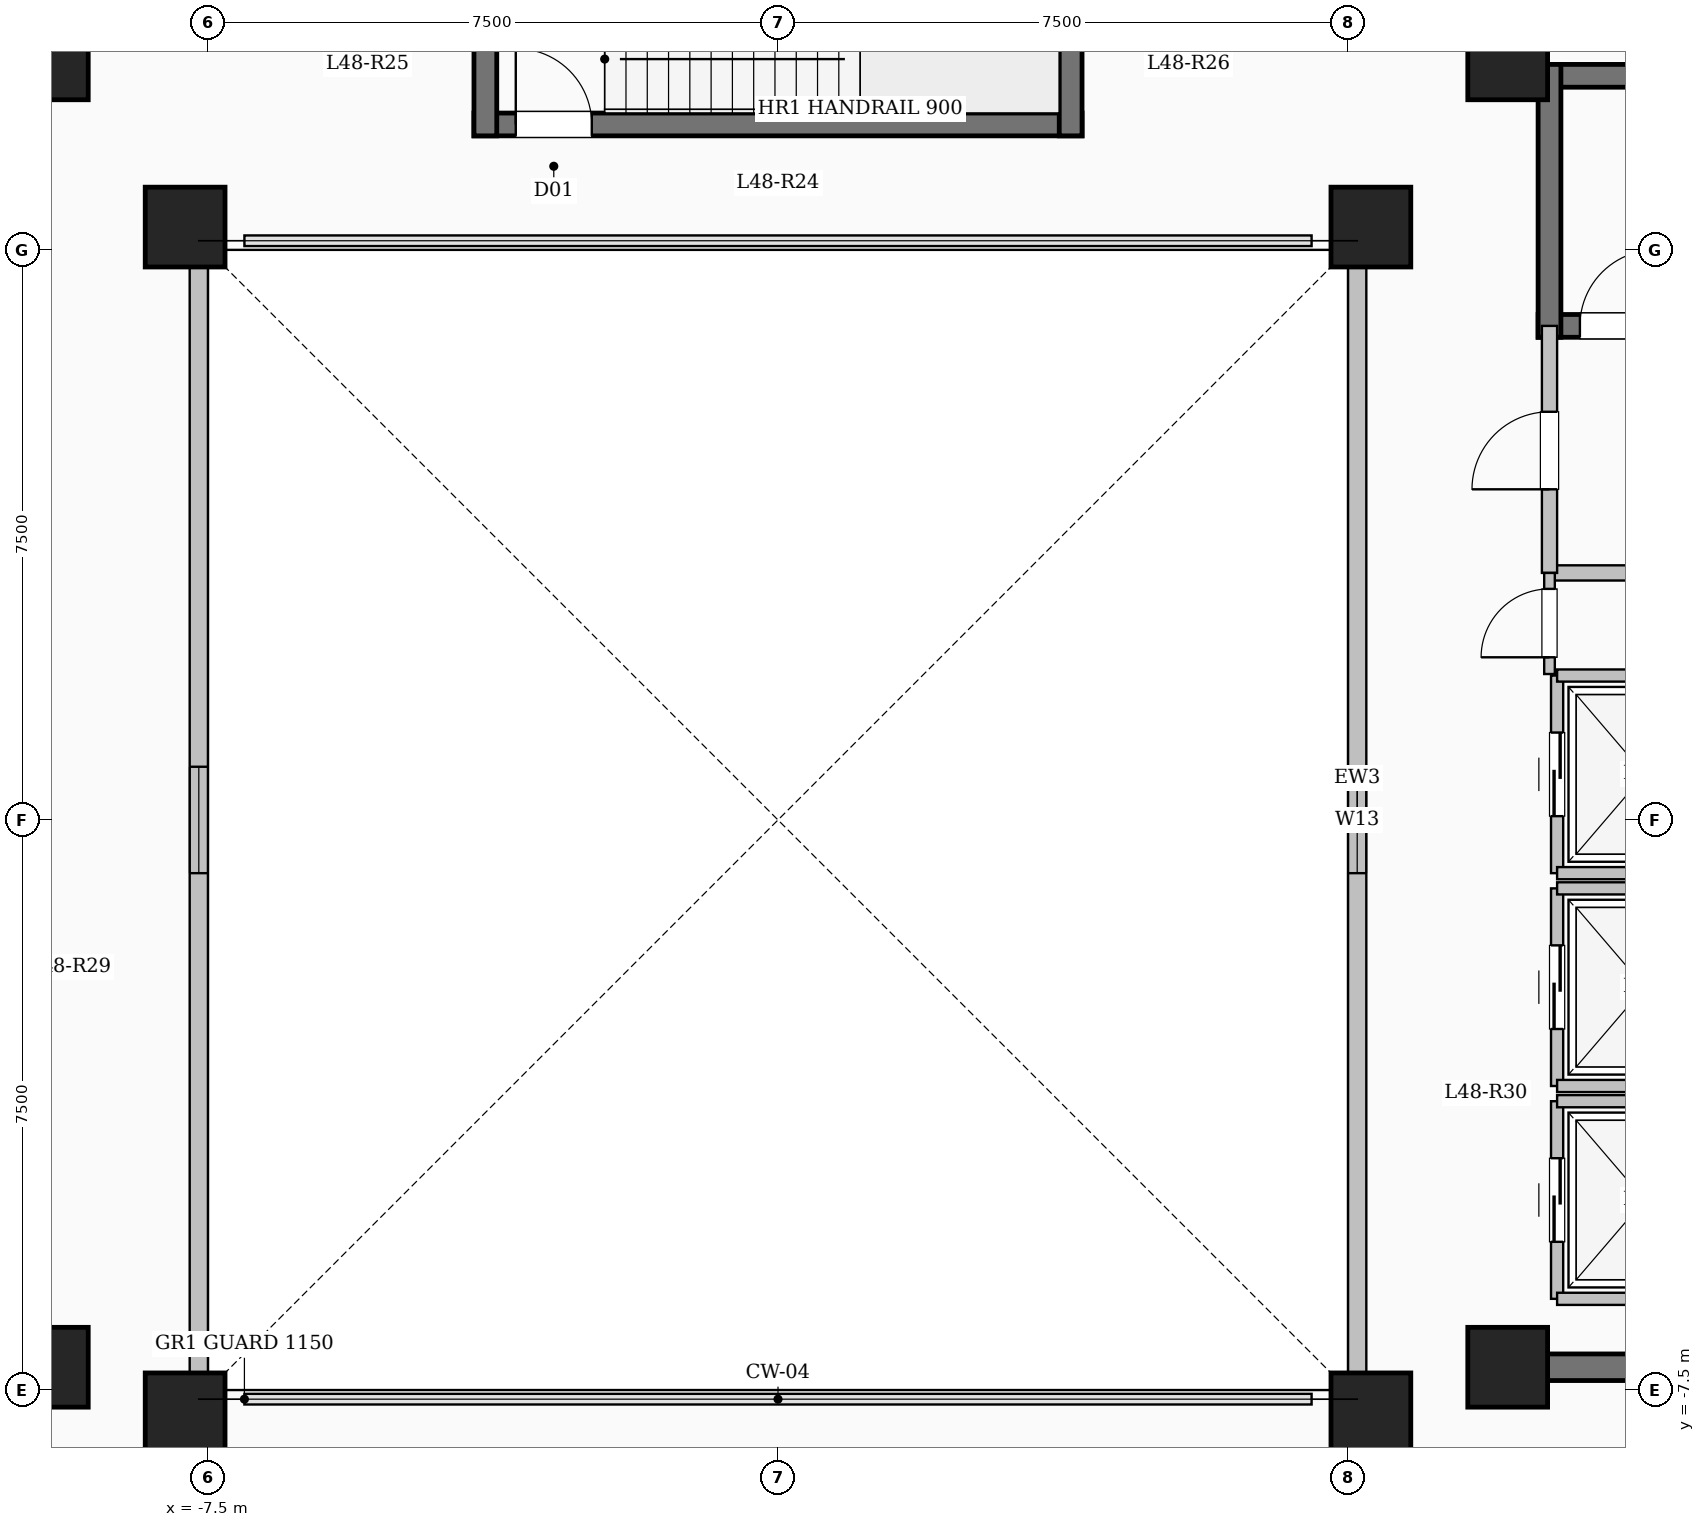
"""IFC4 building model, lengths in metres.
Left out: names, types, materials, properties, quantities, classifications, styles, units other than length and angle.
Written with IfcOpenShell. Run it as: python <this file> out.ifc"""

import sys

from ifc_helpers import new_model, si_unit, direction, frame, frame_2d, origin, origin_2d, place, context, subcontext, project, spatial, rectangle, extrude, element, fill, save


model = new_model("IFC4")
c1 = context("Model", 3, precision=1e-05, world=origin(), true_north=direction((0.0, 1.0)))
c2 = subcontext(c1, "Body", "Model", "MODEL_VIEW")
j1 = project(units=[si_unit("LENGTHUNIT", "METRE"), si_unit("PLANEANGLEUNIT", "RADIAN")], contexts=[c1])
p1 = place(None, origin())
s1 = spatial("IfcSite", under=j1, at=p1, CompositionType="ELEMENT")
p2 = place(p1, origin())
s2 = spatial("IfcBuilding", under=s1, at=p2, CompositionType="ELEMENT")
p3 = place(p2, frame((0.0, 0.0, 177.3)))
s3 = spatial("IfcBuildingStorey", under=s2, at=p3, CompositionType="ELEMENT", Elevation=177.3)
for number, where, z_axis, x_axis in (
    (1, (-7.8, -7.8, 0.0), (0.0, 0.0, 1.0), (1.0, 0.0, 0.0)),
    (2, (7.8, -7.8, 0.0), (0.0, 0.0, 1.0), (1.0, 0.0, 0.0)),
    (3, (-7.8, 7.8, 0.0), (0.0, 0.0, 1.0), (1.0, 0.0, 0.0)),
    (4, (7.8, 7.8, 0.0), (0.0, 0.0, 1.0), (1.0, 0.0, 0.0)),
    (5, (-9.6, -7.2, 0.0), (0.0, 0.0, 1.0), (1.0, 0.0, 0.0)),
    (6, (-9.6, 10.0, 0.0), (0.0, 0.0, 1.0), (1.0, 0.0, 0.0)),
    (7, (9.6, -7.2, 0.0), (0.0, 0.0, 1.0), (1.0, 0.0, 0.0)),
    (8, (9.6, 10.0, 0.0), (0.0, 0.0, 1.0), (1.0, 0.0, 0.0)),
):
    element("IfcColumn", number, at=place(p3, frame(where, z_axis=z_axis, x_axis=x_axis)), inside=s3, PredefinedType="COLUMN", context=c2, shape_type="SweptSolid", body=[
        extrude(rectangle(XDim=1.05, YDim=1.05, at=origin_2d()), origin(), (0.0, 0.0, 1.0), 4.5),
    ])
p4 = place(p3, frame((7.62, -7.62, 0.0), z_axis=(0.0, 0.0, 1.0), x_axis=(0.0, 1.0, 0.0)))
e9 = element("IfcWall", 9, at=p4, inside=s3, PredefinedType="SOLIDWALL", context=c2, shape_type="SweptSolid", body=[
    extrude(rectangle(XDim=15.24, YDim=0.24, at=frame_2d((7.62, 0.0))), origin(), (0.0, 0.0, 1.0), 4.2),
])
p5 = place(p4, frame((6.92, 0.0, 0.95)))
e10 = element("IfcOpeningElement", 10, at=p5, cuts=e9, PredefinedType="OPENING", context=c2, shape_type="SweptSolid", body=[
    extrude(rectangle(XDim=1.4, YDim=1.5, at=frame_2d((0.7, 0.75))), frame((0.0, 0.13, 0.0), z_axis=(0.0, -1.0, 0.0), x_axis=(1.0, 0.0, 0.0)), (0.0, 0.0, 1.0), 0.26),
])
p6 = place(p3, frame((-7.62, 7.62, 0.0), z_axis=(0.0, 0.0, 1.0), x_axis=(0.0, -1.0, 0.0)))
e11 = element("IfcWall", 11, at=p6, inside=s3, PredefinedType="SOLIDWALL", context=c2, shape_type="SweptSolid", body=[
    extrude(rectangle(XDim=15.24, YDim=0.24, at=frame_2d((7.62, 0.0))), origin(), (0.0, 0.0, 1.0), 4.2),
])
p7 = place(p6, frame((6.92, 0.0, 0.95)))
e12 = element("IfcOpeningElement", 12, at=p7, cuts=e11, PredefinedType="OPENING", context=c2, shape_type="SweptSolid", body=[
    extrude(rectangle(XDim=1.4, YDim=1.5, at=frame_2d((0.7, 0.75))), frame((0.0, 0.13, 0.0), z_axis=(0.0, -1.0, 0.0), x_axis=(1.0, 0.0, 0.0)), (0.0, 0.0, 1.0), 0.26),
])
p8 = place(p3, frame((10.0, 9.79, 0.0), z_axis=(0.0, 0.0, 1.0), x_axis=(1.0, 0.0, 0.0)))
e13 = element("IfcWall", 13, at=p8, inside=s3, PredefinedType="SHEAR", context=c2, shape_type="SweptSolid", body=[
    extrude(rectangle(XDim=8.0, YDim=0.3, at=frame_2d((4.0, 0.0))), origin(), (0.0, 0.0, 1.0), 4.5),
])
p9 = place(p3, frame((10.0, 6.5, 0.0), z_axis=(0.0, 0.0, 1.0), x_axis=(1.0, 0.0, 0.0)))
e14 = element("IfcWall", 14, at=p9, inside=s3, PredefinedType="SHEAR", context=c2, shape_type="SweptSolid", body=[
    extrude(rectangle(XDim=8.0, YDim=0.3, at=frame_2d((4.0, 0.0))), origin(), (0.0, 0.0, 1.0), 4.5),
])
p10 = place(p9, frame((0.55, 0.0, 0.0)))
e15 = element("IfcOpeningElement", 15, at=p10, cuts=e14, PredefinedType="OPENING", context=c2, shape_type="SweptSolid", body=[
    extrude(rectangle(XDim=1.0, YDim=2.15, at=frame_2d((0.5, 1.075))), frame((0.0, 0.16, 0.0), z_axis=(0.0, -1.0, 0.0), x_axis=(1.0, 0.0, 0.0)), (0.0, 0.0, 1.0), 0.32),
])
p11 = place(p3, frame((10.15, 6.35, 0.0), z_axis=(0.0, 0.0, 1.0), x_axis=(0.0, 1.0, 0.0)))
e16 = element("IfcWall", 16, at=p11, inside=s3, PredefinedType="SHEAR", context=c2, shape_type="SweptSolid", body=[
    extrude(rectangle(XDim=3.59, YDim=0.3, at=frame_2d((1.795, 0.0))), origin(), (0.0, 0.0, 1.0), 4.5),
])
p12 = place(p3, frame((-4.0, 9.15, 0.0), z_axis=(0.0, 0.0, 1.0), x_axis=(1.0, 0.0, 0.0)))
e17 = element("IfcWall", 17, at=p12, inside=s3, PredefinedType="SHEAR", context=c2, shape_type="SweptSolid", body=[
    extrude(rectangle(XDim=8.0, YDim=0.3, at=frame_2d((4.0, 0.0))), origin(), (0.0, 0.0, 1.0), 4.5),
])
p13 = place(p12, frame((0.55, 0.0, 0.0)))
e18 = element("IfcOpeningElement", 18, at=p13, cuts=e17, PredefinedType="OPENING", context=c2, shape_type="SweptSolid", body=[
    extrude(rectangle(XDim=1.0, YDim=2.15, at=frame_2d((0.5, 1.075))), frame((0.0, 0.16, 0.0), z_axis=(0.0, -1.0, 0.0), x_axis=(1.0, 0.0, 0.0)), (0.0, 0.0, 1.0), 0.32),
])
for number, where, z_axis, x_axis in (
    (19, (-3.85, 9.0, 0.0), (0.0, 0.0, 1.0), (0.0, 1.0, 0.0)),
    (20, (3.85, 9.0, 0.0), (0.0, 0.0, 1.0), (0.0, 1.0, 0.0)),
):
    element("IfcWall", number, at=place(p3, frame(where, z_axis=z_axis, x_axis=x_axis)), inside=s3, PredefinedType="SHEAR", context=c2, shape_type="SweptSolid", body=[
        extrude(rectangle(XDim=3.59, YDim=0.3, at=frame_2d((1.795, 0.0))), origin(), (0.0, 0.0, 1.0), 4.5),
    ])
p14 = place(p3, frame((10.15, 3.25, 0.0), z_axis=(0.0, 0.0, 1.0), x_axis=(1.0, 0.0, 0.0)))
e21 = element("IfcWall", 21, at=p14, inside=s3, PredefinedType="SOLIDWALL", context=c2, shape_type="SweptSolid", body=[
    extrude(rectangle(XDim=5.4, YDim=0.2, at=frame_2d((2.7, 0.0))), origin(), (0.0, 0.0, 1.0), 4.2),
])
p15 = place(p3, frame((10.15, 3.25, 0.0), z_axis=(0.0, 0.0, 1.0), x_axis=(0.0, 1.0, 0.0)))
e22 = element("IfcWall", 22, at=p15, inside=s3, PredefinedType="SOLIDWALL", context=c2, shape_type="SweptSolid", body=[
    extrude(rectangle(XDim=3.25, YDim=0.2, at=frame_2d((1.625, 0.0))), origin(), (0.0, 0.0, 1.0), 4.2),
])
p16 = place(p15, frame((1.1, 0.0, 0.0)))
e23 = element("IfcOpeningElement", 23, at=p16, cuts=e22, PredefinedType="OPENING", context=c2, shape_type="SweptSolid", body=[
    extrude(rectangle(XDim=1.02, YDim=2.15, at=frame_2d((0.51, 1.075))), frame((0.0, 0.11, 0.0), z_axis=(0.0, -1.0, 0.0), x_axis=(1.0, 0.0, 0.0)), (0.0, 0.0, 1.0), 0.22),
])
p17 = place(p3, frame((10.25, -6.3, 0.0), z_axis=(0.0, 0.0, 1.0), x_axis=(0.0, 1.0, 0.0)))
e24 = element("IfcWall", 24, at=p17, inside=s3, PredefinedType="SOLIDWALL", context=c2, shape_type="SweptSolid", body=[
    extrude(rectangle(XDim=2.6, YDim=0.16, at=frame_2d((1.3, 0.0))), origin(), (0.0, 0.0, 1.0), 4.2),
])
p18 = place(p17, frame((0.75, 0.0, 0.0)))
e25 = element("IfcOpeningElement", 25, at=p18, cuts=e24, PredefinedType="OPENING", context=c2, shape_type="SweptSolid", body=[
    extrude(rectangle(XDim=1.1, YDim=2.15, at=frame_2d((0.55, 1.075))), frame((0.0, 0.09, 0.0), z_axis=(0.0, -1.0, 0.0), x_axis=(1.0, 0.0, 0.0)), (0.0, 0.0, 1.0), 0.18),
])
for number, where, z_axis, x_axis in (
    (26, (10.25, -6.3, 0.0), (0.0, 0.0, 1.0), (1.0, 0.0, 0.0)),
    (27, (10.25, -3.7, 0.0), (0.0, 0.0, 1.0), (1.0, 0.0, 0.0)),
):
    element("IfcWall", number, at=place(p3, frame(where, z_axis=z_axis, x_axis=x_axis)), inside=s3, PredefinedType="SOLIDWALL", context=c2, shape_type="SweptSolid", body=[
        extrude(rectangle(XDim=2.3, YDim=0.16, at=frame_2d((1.15, 0.0))), origin(), (0.0, 0.0, 1.0), 4.2),
    ])
p19 = place(p3, frame((10.25, -3.5, 0.0), z_axis=(0.0, 0.0, 1.0), x_axis=(0.0, 1.0, 0.0)))
e28 = element("IfcWall", 28, at=p19, inside=s3, PredefinedType="SOLIDWALL", context=c2, shape_type="SweptSolid", body=[
    extrude(rectangle(XDim=2.6, YDim=0.16, at=frame_2d((1.3, 0.0))), origin(), (0.0, 0.0, 1.0), 4.2),
])
p20 = place(p19, frame((0.75, 0.0, 0.0)))
e29 = element("IfcOpeningElement", 29, at=p20, cuts=e28, PredefinedType="OPENING", context=c2, shape_type="SweptSolid", body=[
    extrude(rectangle(XDim=1.1, YDim=2.15, at=frame_2d((0.55, 1.075))), frame((0.0, 0.09, 0.0), z_axis=(0.0, -1.0, 0.0), x_axis=(1.0, 0.0, 0.0)), (0.0, 0.0, 1.0), 0.18),
])
for number, where, z_axis, x_axis in (
    (30, (10.25, -3.5, 0.0), (0.0, 0.0, 1.0), (1.0, 0.0, 0.0)),
    (31, (10.25, -0.9, 0.0), (0.0, 0.0, 1.0), (1.0, 0.0, 0.0)),
):
    element("IfcWall", number, at=place(p3, frame(where, z_axis=z_axis, x_axis=x_axis)), inside=s3, PredefinedType="SOLIDWALL", context=c2, shape_type="SweptSolid", body=[
        extrude(rectangle(XDim=2.3, YDim=0.16, at=frame_2d((1.15, 0.0))), origin(), (0.0, 0.0, 1.0), 4.2),
    ])
p21 = place(p3, frame((10.25, -0.7, 0.0), z_axis=(0.0, 0.0, 1.0), x_axis=(0.0, 1.0, 0.0)))
e32 = element("IfcWall", 32, at=p21, inside=s3, PredefinedType="SOLIDWALL", context=c2, shape_type="SweptSolid", body=[
    extrude(rectangle(XDim=2.6, YDim=0.16, at=frame_2d((1.3, 0.0))), origin(), (0.0, 0.0, 1.0), 4.2),
])
p22 = place(p21, frame((0.75, 0.0, 0.0)))
e33 = element("IfcOpeningElement", 33, at=p22, cuts=e32, PredefinedType="OPENING", context=c2, shape_type="SweptSolid", body=[
    extrude(rectangle(XDim=1.1, YDim=2.15, at=frame_2d((0.55, 1.075))), frame((0.0, 0.09, 0.0), z_axis=(0.0, -1.0, 0.0), x_axis=(1.0, 0.0, 0.0)), (0.0, 0.0, 1.0), 0.18),
])
for number, where, z_axis, x_axis in (
    (34, (10.25, -0.7, 0.0), (0.0, 0.0, 1.0), (1.0, 0.0, 0.0)),
    (35, (10.25, 1.9, 0.0), (0.0, 0.0, 1.0), (1.0, 0.0, 0.0)),
):
    element("IfcWall", number, at=place(p3, frame(where, z_axis=z_axis, x_axis=x_axis)), inside=s3, PredefinedType="SOLIDWALL", context=c2, shape_type="SweptSolid", body=[
        extrude(rectangle(XDim=2.3, YDim=0.16, at=frame_2d((1.15, 0.0))), origin(), (0.0, 0.0, 1.0), 4.2),
    ])
p23 = place(p3, frame((10.075, -7.2, 0.0), z_axis=(0.0, 0.0, 1.0), x_axis=(1.0, 0.0, 0.0)))
e36 = element("IfcWall", 36, at=p23, inside=s3, PredefinedType="SHEAR", context=c2, shape_type="SweptSolid", body=[
    extrude(rectangle(XDim=8.55, YDim=0.35, at=frame_2d((4.275, 0.0))), origin(), (0.0, 0.0, 1.0), 4.5),
])
p24 = place(p3, frame((10.15, 1.92, 0.0), z_axis=(0.0, 0.0, 1.0), x_axis=(0.0, 1.0, 0.0)))
e37 = element("IfcWall", 37, at=p24, inside=s3, PredefinedType="PARTITIONING", context=c2, shape_type="SweptSolid", body=[
    extrude(rectangle(XDim=1.33, YDim=0.14, at=frame_2d((0.665, 0.0))), origin(), (0.0, 0.0, 1.0), 4.2),
])
p25 = place(p24, frame((0.22, 0.0, 0.0)))
e38 = element("IfcOpeningElement", 38, at=p25, cuts=e37, PredefinedType="OPENING", context=c2, shape_type="SweptSolid", body=[
    extrude(rectangle(XDim=0.9, YDim=2.08, at=frame_2d((0.45, 1.04))), frame((0.0, 0.08, 0.0), z_axis=(0.0, -1.0, 0.0), x_axis=(1.0, 0.0, 0.0)), (0.0, 0.0, 1.0), 0.16),
])
p26 = place(p5, origin())
e39 = element("IfcWindow", 39, at=p26, inside=s3, PartitioningType="SINGLE_PANEL", PredefinedType="WINDOW", context=c2, shape_type="SweptSolid", body=[
    extrude(rectangle(XDim=1.4, YDim=1.5, at=frame_2d((0.7, 0.75))), frame((0.0, 0.03, 0.0), z_axis=(0.0, -1.0, 0.0), x_axis=(1.0, 0.0, 0.0)), (0.0, 0.0, 1.0), 0.06),
])
fill(e10, e39)
p27 = place(p7, origin())
e40 = element("IfcWindow", 40, at=p27, inside=s3, PartitioningType="SINGLE_PANEL", PredefinedType="WINDOW", context=c2, shape_type="SweptSolid", body=[
    extrude(rectangle(XDim=1.4, YDim=1.5, at=frame_2d((0.7, 0.75))), frame((0.0, 0.03, 0.0), z_axis=(0.0, -1.0, 0.0), x_axis=(1.0, 0.0, 0.0)), (0.0, 0.0, 1.0), 0.06),
])
fill(e12, e40)
p28 = place(p10, origin())
e41 = element("IfcDoor", 41, at=p28, inside=s3, OperationType="SINGLE_SWING_RIGHT", PredefinedType="DOOR", context=c2, shape_type="SweptSolid", body=[
    extrude(rectangle(XDim=1.0, YDim=2.15, at=frame_2d((0.5, 1.075))), frame((0.0, 0.025, 0.0), z_axis=(0.0, -1.0, 0.0), x_axis=(1.0, 0.0, 0.0)), (0.0, 0.0, 1.0), 0.05),
])
fill(e15, e41)
p29 = place(p13, origin())
e42 = element("IfcDoor", 42, at=p29, inside=s3, OperationType="SINGLE_SWING_LEFT", PredefinedType="DOOR", context=c2, shape_type="SweptSolid", body=[
    extrude(rectangle(XDim=1.0, YDim=2.15, at=frame_2d((0.5, 1.075))), frame((0.0, 0.025, 0.0), z_axis=(0.0, -1.0, 0.0), x_axis=(1.0, 0.0, 0.0)), (0.0, 0.0, 1.0), 0.05),
])
fill(e18, e42)
p30 = place(p16, origin())
e43 = element("IfcDoor", 43, at=p30, inside=s3, OperationType="SINGLE_SWING_LEFT", PredefinedType="DOOR", context=c2, shape_type="SweptSolid", body=[
    extrude(rectangle(XDim=1.02, YDim=2.15, at=frame_2d((0.51, 1.075))), frame((0.0, 0.025, 0.0), z_axis=(0.0, -1.0, 0.0), x_axis=(1.0, 0.0, 0.0)), (0.0, 0.0, 1.0), 0.05),
])
fill(e23, e43)
p31 = place(p18, origin())
e44 = element("IfcDoor", 44, at=p31, inside=s3, OperationType="SLIDING_TO_LEFT", PredefinedType="DOOR", context=c2, shape_type="SweptSolid", body=[
    extrude(rectangle(XDim=1.1, YDim=2.15, at=frame_2d((0.55, 1.075))), frame((0.0, 0.025, 0.0), z_axis=(0.0, -1.0, 0.0), x_axis=(1.0, 0.0, 0.0)), (0.0, 0.0, 1.0), 0.05),
])
fill(e25, e44)
p32 = place(p20, origin())
e45 = element("IfcDoor", 45, at=p32, inside=s3, OperationType="SLIDING_TO_LEFT", PredefinedType="DOOR", context=c2, shape_type="SweptSolid", body=[
    extrude(rectangle(XDim=1.1, YDim=2.15, at=frame_2d((0.55, 1.075))), frame((0.0, 0.025, 0.0), z_axis=(0.0, -1.0, 0.0), x_axis=(1.0, 0.0, 0.0)), (0.0, 0.0, 1.0), 0.05),
])
fill(e29, e45)
p33 = place(p22, origin())
e46 = element("IfcDoor", 46, at=p33, inside=s3, OperationType="SLIDING_TO_LEFT", PredefinedType="DOOR", context=c2, shape_type="SweptSolid", body=[
    extrude(rectangle(XDim=1.1, YDim=2.15, at=frame_2d((0.55, 1.075))), frame((0.0, 0.025, 0.0), z_axis=(0.0, -1.0, 0.0), x_axis=(1.0, 0.0, 0.0)), (0.0, 0.0, 1.0), 0.05),
])
fill(e33, e46)
p34 = place(p25, origin())
e47 = element("IfcDoor", 47, at=p34, inside=s3, OperationType="SINGLE_SWING_LEFT", PredefinedType="DOOR", context=c2, shape_type="SweptSolid", body=[
    extrude(rectangle(XDim=0.9, YDim=2.08, at=frame_2d((0.45, 1.04))), frame((0.0, 0.025, 0.0), z_axis=(0.0, -1.0, 0.0), x_axis=(1.0, 0.0, 0.0)), (0.0, 0.0, 1.0), 0.05),
])
fill(e38, e47)
save(model, sys.argv[1])
